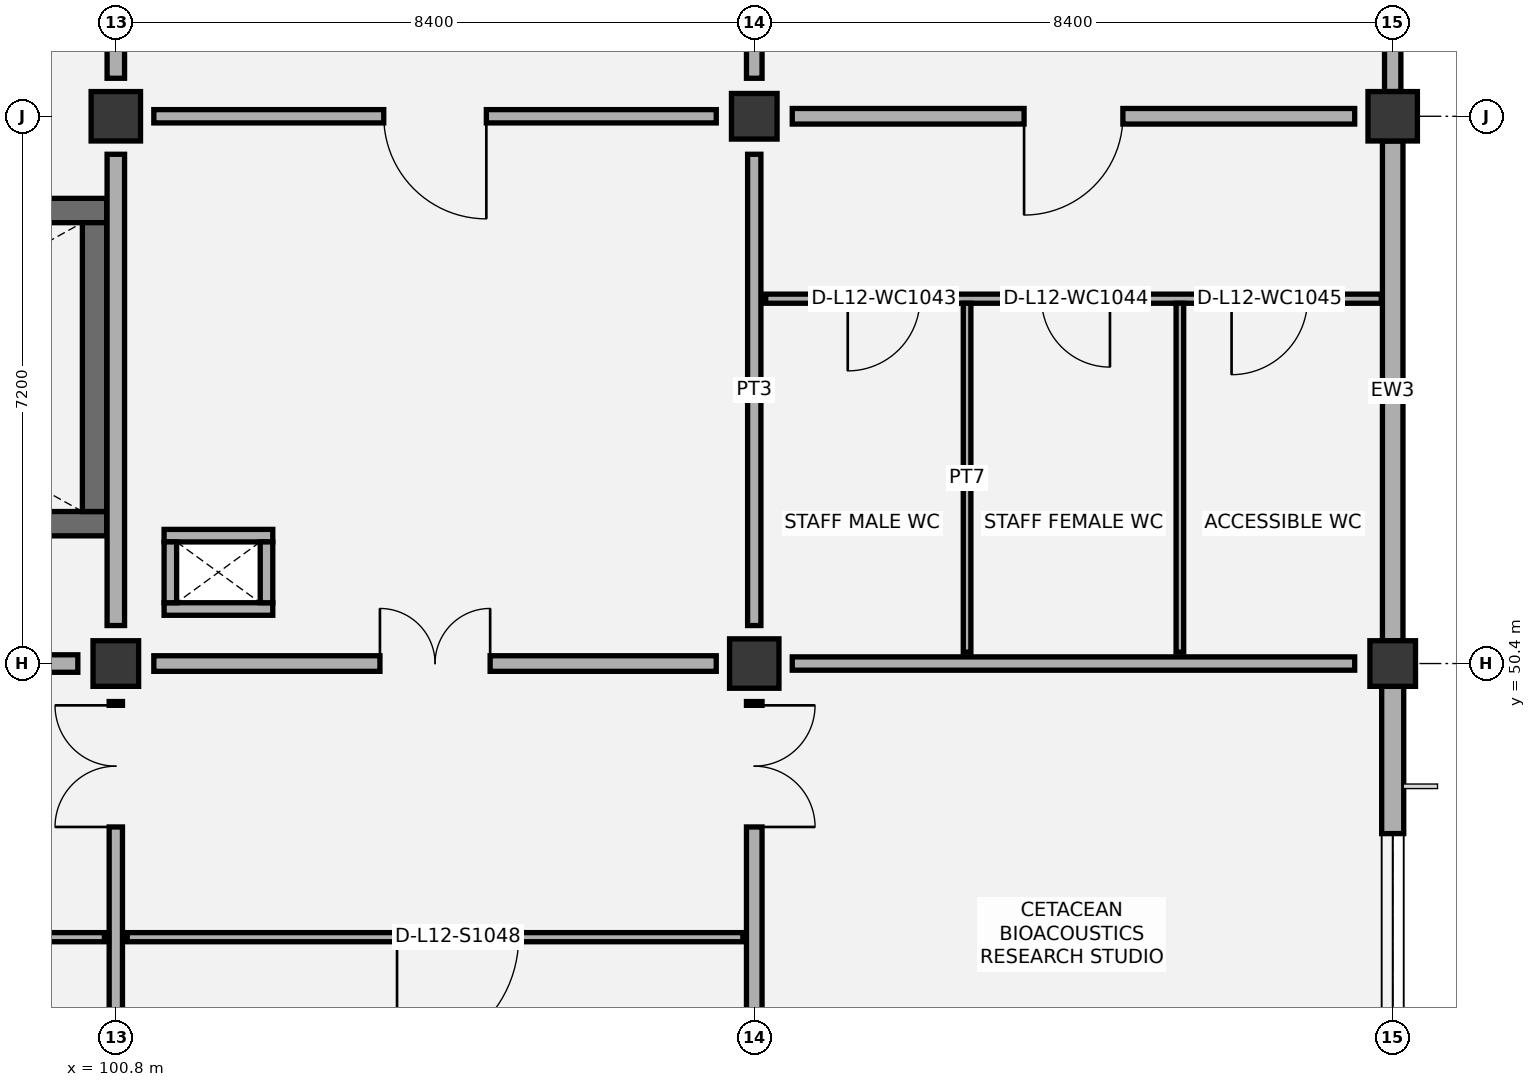
"""IFC4 building model, lengths in metres.
Left out: names, types, materials, properties, quantities, classifications, styles, units other than length and angle.
Written with IfcOpenShell. Run it as: python <this file> out.ifc"""

import sys

from ifc_helpers import new_model, si_unit, direction, frame, frame_2d, origin, origin_2d, place, context, subcontext, project, spatial, rectangle, extrude, element, fill, save


model = new_model("IFC4")
c1 = context("Model", 3, precision=1e-05, world=origin(), true_north=direction((0.0, 1.0)))
c2 = subcontext(c1, "Body", "Model", "MODEL_VIEW")
j1 = project(units=[si_unit("LENGTHUNIT", "METRE"), si_unit("PLANEANGLEUNIT", "RADIAN")], contexts=[c1])
p1 = place(None, origin())
s1 = spatial("IfcSite", under=j1, at=p1, CompositionType="ELEMENT")
p2 = place(p1, origin())
s2 = spatial("IfcBuilding", under=s1, at=p2, CompositionType="ELEMENT")
p3 = place(p2, frame((0.0, 0.0, 56.4)))
s3 = spatial("IfcBuildingStorey", under=s2, at=p3, CompositionType="ELEMENT", Elevation=56.4)
p4 = place(p3, frame((100.8, 50.4, 0.0), z_axis=(0.0, 0.0, 1.0), x_axis=(1.0, 0.0, 0.0)))
e1 = element("IfcColumn", 1, at=p4, inside=s3, PredefinedType="COLUMN", context=c2, shape_type="SweptSolid", body=[
    extrude(rectangle(XDim=0.6, YDim=0.6, at=origin_2d()), origin(), (0.0, 0.0, 1.0), 4.2),
])
for number, where, z_axis, x_axis in (
    (2, (100.8, 57.6, 0.0), (0.0, 0.0, 1.0), (1.0, 0.0, 0.0)),
    (3, (109.2, 50.4, 0.0), (0.0, 0.0, 1.0), (1.0, 0.0, 0.0)),
):
    element("IfcColumn", number, at=place(p3, frame(where, z_axis=z_axis, x_axis=x_axis)), inside=s3, PredefinedType="COLUMN", context=c2, shape_type="SweptSolid", body=[
        extrude(rectangle(XDim=0.65, YDim=0.65, at=origin_2d()), origin(), (0.0, 0.0, 1.0), 4.2),
    ])
for number, where, z_axis, x_axis in (
    (4, (109.2, 57.6, 0.0), (0.0, 0.0, 1.0), (1.0, 0.0, 0.0)),
    (5, (117.6, 50.4, 0.0), (0.0, 0.0, 1.0), (1.0, 0.0, 0.0)),
):
    element("IfcColumn", number, at=place(p3, frame(where, z_axis=z_axis, x_axis=x_axis)), inside=s3, PredefinedType="COLUMN", context=c2, shape_type="SweptSolid", body=[
        extrude(rectangle(XDim=0.6, YDim=0.6, at=origin_2d()), origin(), (0.0, 0.0, 1.0), 4.2),
    ])
p5 = place(p3, frame((117.6, 57.6, 0.0), z_axis=(0.0, 0.0, 1.0), x_axis=(1.0, 0.0, 0.0)))
e6 = element("IfcColumn", 6, at=p5, inside=s3, PredefinedType="COLUMN", context=c2, shape_type="SweptSolid", body=[
    extrude(rectangle(XDim=0.65, YDim=0.65, at=origin_2d()), origin(), (0.0, 0.0, 1.0), 4.2),
])
p6 = place(p3, frame((93.2, 52.24, 0.0), z_axis=(0.0, 0.0, 1.0), x_axis=(1.0, 0.0, 0.0)))
e7 = element("IfcWall", 7, at=p6, inside=s3, PredefinedType="SHEAR", context=c2, shape_type="SweptSolid", body=[
    extrude(rectangle(XDim=7.48, YDim=0.32, at=frame_2d((3.74, 0.0))), origin(), (0.0, 0.0, 1.0), 3.92),
])
p7 = place(p6, frame((0.45, 0.0, 0.0)))
e8 = element("IfcOpeningElement", 8, at=p7, cuts=e7, PredefinedType="OPENING", context=c2, shape_type="SweptSolid", body=[
    extrude(rectangle(XDim=1.05, YDim=2.15, at=frame_2d((0.525, 1.075))), frame((0.0, 0.17, 0.0), z_axis=(0.0, -1.0, 0.0), x_axis=(1.0, 0.0, 0.0)), (0.0, 0.0, 1.0), 0.34),
])
p8 = place(p3, frame((93.2, 56.36, 0.0), z_axis=(0.0, 0.0, 1.0), x_axis=(1.0, 0.0, 0.0)))
e9 = element("IfcWall", 9, at=p8, inside=s3, PredefinedType="SHEAR", context=c2, shape_type="SweptSolid", body=[
    extrude(rectangle(XDim=7.48, YDim=0.32, at=frame_2d((3.74, 0.0))), origin(), (0.0, 0.0, 1.0), 3.92),
])
p9 = place(p3, frame((100.52, 52.4, 0.0), z_axis=(0.0, 0.0, 1.0), x_axis=(0.0, 1.0, 0.0)))
e10 = element("IfcWall", 10, at=p9, inside=s3, PredefinedType="SHEAR", context=c2, shape_type="SweptSolid", body=[
    extrude(rectangle(XDim=3.8, YDim=0.32, at=frame_2d((1.9, 0.0))), origin(), (0.0, 0.0, 1.0), 3.92),
])
p10 = place(p3, frame((117.6, 43.525, 0.0), z_axis=(0.0, 0.0, 1.0), x_axis=(0.0, 1.0, 0.0)))
e11 = element("IfcWall", 11, at=p10, inside=s3, PredefinedType="SOLIDWALL", context=c2, shape_type="SweptSolid", body=[
    extrude(rectangle(XDim=6.575, YDim=0.29, at=frame_2d((3.288, 0.0))), origin(), (0.0, 0.0, 1.0), 3.295),
])
p11 = place(p10, frame((1.938, 0.0, 0.95)))
e12 = element("IfcOpeningElement", 12, at=p11, cuts=e11, PredefinedType="OPENING", context=c2, shape_type="SweptSolid", body=[
    extrude(rectangle(XDim=2.7, YDim=1.65, at=frame_2d((1.35, 0.825))), frame((0.0, 0.155, 0.0), z_axis=(0.0, -1.0, 0.0), x_axis=(1.0, 0.0, 0.0)), (0.0, 0.0, 1.0), 0.31),
])
p12 = place(p3, frame((117.6, 50.7, 0.0), z_axis=(0.0, 0.0, 1.0), x_axis=(0.0, 1.0, 0.0)))
e13 = element("IfcWall", 13, at=p12, inside=s3, PredefinedType="SOLIDWALL", context=c2, shape_type="SweptSolid", body=[
    extrude(rectangle(XDim=6.575, YDim=0.27, at=frame_2d((3.288, 0.0))), origin(), (0.0, 0.0, 1.0), 3.295),
])
p13 = place(p3, frame((117.6, 57.925, 0.0), z_axis=(0.0, 0.0, 1.0), x_axis=(0.0, 1.0, 0.0)))
e14 = element("IfcWall", 14, at=p13, inside=s3, PredefinedType="SOLIDWALL", context=c2, shape_type="SweptSolid", body=[
    extrude(rectangle(XDim=6.575, YDim=0.215, at=frame_2d((3.288, 0.0))), origin(), (0.0, 0.0, 1.0), 3.295),
])
p14 = place(p13, frame((1.192, 0.0, 0.95)))
e15 = element("IfcOpeningElement", 15, at=p14, cuts=e14, PredefinedType="OPENING", context=c2, shape_type="SweptSolid", body=[
    extrude(rectangle(XDim=1.5, YDim=1.5, at=frame_2d((0.75, 0.75))), frame((0.0, 0.117, 0.0), z_axis=(0.0, -1.0, 0.0), x_axis=(1.0, 0.0, 0.0)), (0.0, 0.0, 1.0), 0.235),
])
p15 = place(p13, frame((3.883, 0.0, 0.95)))
e16 = element("IfcOpeningElement", 16, at=p15, cuts=e14, PredefinedType="OPENING", context=c2, shape_type="SweptSolid", body=[
    extrude(rectangle(XDim=1.5, YDim=1.5, at=frame_2d((0.75, 0.75))), frame((0.0, 0.117, 0.0), z_axis=(0.0, -1.0, 0.0), x_axis=(1.0, 0.0, 0.0)), (0.0, 0.0, 1.0), 0.235),
])
for number, where, z_axis, x_axis in (
    (17, (101.435, 51.117, 0.0), (0.0, 0.0, 1.0), (1.0, 0.0, 0.0)),
    (18, (101.435, 52.083, 0.0), (0.0, 0.0, 1.0), (1.0, 0.0, 0.0)),
):
    element("IfcWall", number, at=place(p3, frame(where, z_axis=z_axis, x_axis=x_axis)), inside=s3, PredefinedType="PARTITIONING", context=c2, shape_type="SweptSolid", body=[
        extrude(rectangle(XDim=1.43, YDim=0.165, at=frame_2d((0.715, 0.0))), origin(), (0.0, 0.0, 1.0), 3.85),
    ])
for number, where, z_axis, x_axis in (
    (19, (101.518, 51.2, 0.0), (0.0, 0.0, 1.0), (0.0, 1.0, 0.0)),
    (20, (102.782, 51.2, 0.0), (0.0, 0.0, 1.0), (0.0, 1.0, 0.0)),
):
    element("IfcWall", number, at=place(p3, frame(where, z_axis=z_axis, x_axis=x_axis)), inside=s3, PredefinedType="PARTITIONING", context=c2, shape_type="SweptSolid", body=[
        extrude(rectangle(XDim=0.8, YDim=0.165, at=frame_2d((0.4, 0.0))), origin(), (0.0, 0.0, 1.0), 3.85),
    ])
p16 = place(p3, frame((109.35, 55.2, 0.0), z_axis=(0.0, 0.0, 1.0), x_axis=(1.0, 0.0, 0.0)))
e21 = element("IfcWall", 21, at=p16, inside=s3, PredefinedType="PARTITIONING", context=c2, shape_type="SweptSolid", body=[
    extrude(rectangle(XDim=8.1, YDim=0.12, at=frame_2d((4.05, 0.0))), origin(), (0.0, 0.0, 1.0), 3.85),
])
p17 = place(p16, frame((1.08, 0.0, 0.0)))
e22 = element("IfcOpeningElement", 22, at=p17, cuts=e21, PredefinedType="OPENING", context=c2, shape_type="SweptSolid", body=[
    extrude(rectangle(XDim=0.95, YDim=2.1, at=frame_2d((0.475, 1.05))), frame((0.0, 0.07, 0.0), z_axis=(0.0, -1.0, 0.0), x_axis=(1.0, 0.0, 0.0)), (0.0, 0.0, 1.0), 0.14),
])
p18 = place(p16, frame((3.63, 0.0, 0.0)))
e23 = element("IfcOpeningElement", 23, at=p18, cuts=e21, PredefinedType="OPENING", context=c2, shape_type="SweptSolid", body=[
    extrude(rectangle(XDim=0.9, YDim=2.1, at=frame_2d((0.45, 1.05))), frame((0.0, 0.07, 0.0), z_axis=(0.0, -1.0, 0.0), x_axis=(1.0, 0.0, 0.0)), (0.0, 0.0, 1.0), 0.14),
])
p19 = place(p16, frame((6.13, 0.0, 0.0)))
e24 = element("IfcOpeningElement", 24, at=p19, cuts=e21, PredefinedType="OPENING", context=c2, shape_type="SweptSolid", body=[
    extrude(rectangle(XDim=1.0, YDim=2.1, at=frame_2d((0.5, 1.05))), frame((0.0, 0.07, 0.0), z_axis=(0.0, -1.0, 0.0), x_axis=(1.0, 0.0, 0.0)), (0.0, 0.0, 1.0), 0.14),
])
for number, where, z_axis, x_axis in (
    (25, (112.0, 50.55, 0.0), (0.0, 0.0, 1.0), (0.0, 1.0, 0.0)),
    (26, (114.8, 50.55, 0.0), (0.0, 0.0, 1.0), (0.0, 1.0, 0.0)),
):
    element("IfcWall", number, at=place(p3, frame(where, z_axis=z_axis, x_axis=x_axis)), inside=s3, PredefinedType="PARTITIONING", context=c2, shape_type="SweptSolid", body=[
        extrude(rectangle(XDim=4.59, YDim=0.1, at=frame_2d((2.295, 0.0))), origin(), (0.0, 0.0, 1.0), 3.85),
    ])
p20 = place(p3, frame((92.55, 46.8, 0.0), z_axis=(0.0, 0.0, 1.0), x_axis=(1.0, 0.0, 0.0)))
e27 = element("IfcWall", 27, at=p20, inside=s3, PredefinedType="PARTITIONING", context=c2, shape_type="SweptSolid", body=[
    extrude(rectangle(XDim=8.1, YDim=0.12, at=frame_2d((4.05, 0.0))), origin(), (0.0, 0.0, 1.0), 3.92),
])
p21 = place(p20, frame((3.55, 0.0, 0.0)))
e28 = element("IfcOpeningElement", 28, at=p21, cuts=e27, PredefinedType="OPENING", context=c2, shape_type="SweptSolid", body=[
    extrude(rectangle(XDim=1.6, YDim=2.2, at=frame_2d((0.8, 1.1))), frame((0.0, 0.07, 0.0), z_axis=(0.0, -1.0, 0.0), x_axis=(1.0, 0.0, 0.0)), (0.0, 0.0, 1.0), 0.14),
])
p22 = place(p3, frame((100.95, 46.8, 0.0), z_axis=(0.0, 0.0, 1.0), x_axis=(1.0, 0.0, 0.0)))
e29 = element("IfcWall", 29, at=p22, inside=s3, PredefinedType="PARTITIONING", context=c2, shape_type="SweptSolid", body=[
    extrude(rectangle(XDim=8.1, YDim=0.12, at=frame_2d((4.05, 0.0))), origin(), (0.0, 0.0, 1.0), 3.92),
])
p23 = place(p22, frame((3.55, 0.0, 0.0)))
e30 = element("IfcOpeningElement", 30, at=p23, cuts=e29, PredefinedType="OPENING", context=c2, shape_type="SweptSolid", body=[
    extrude(rectangle(XDim=1.6, YDim=2.2, at=frame_2d((0.8, 1.1))), frame((0.0, 0.07, 0.0), z_axis=(0.0, -1.0, 0.0), x_axis=(1.0, 0.0, 0.0)), (0.0, 0.0, 1.0), 0.14),
])
p24 = place(p3, frame((100.8, 43.7, 0.0), z_axis=(0.0, 0.0, 1.0), x_axis=(0.0, 1.0, 0.0)))
e31 = element("IfcWall", 31, at=p24, inside=s3, PredefinedType="PARTITIONING", context=c2, shape_type="SweptSolid", body=[
    extrude(rectangle(XDim=6.2, YDim=0.175, at=frame_2d((3.1, 0.0))), origin(), (0.0, 0.0, 1.0), 3.515),
])
p25 = place(p24, frame((4.55, 0.0, 0.0)))
e32 = element("IfcOpeningElement", 32, at=p25, cuts=e31, PredefinedType="OPENING", context=c2, shape_type="SweptSolid", body=[
    extrude(rectangle(XDim=1.6, YDim=2.2, at=frame_2d((0.8, 1.1))), frame((0.0, 0.097, 0.0), z_axis=(0.0, -1.0, 0.0), x_axis=(1.0, 0.0, 0.0)), (0.0, 0.0, 1.0), 0.195),
])
p26 = place(p3, frame((92.9, 50.4, 0.0), z_axis=(0.0, 0.0, 1.0), x_axis=(1.0, 0.0, 0.0)))
e33 = element("IfcWall", 33, at=p26, inside=s3, PredefinedType="PARTITIONING", context=c2, shape_type="SweptSolid", body=[
    extrude(rectangle(XDim=7.4, YDim=0.23, at=frame_2d((3.7, 0.0))), origin(), (0.0, 0.0, 1.0), 3.415),
])
p27 = place(p26, frame((2.95, 0.0, 0.0)))
e34 = element("IfcOpeningElement", 34, at=p27, cuts=e33, PredefinedType="OPENING", context=c2, shape_type="SweptSolid", body=[
    extrude(rectangle(XDim=1.5, YDim=2.15, at=frame_2d((0.75, 1.075))), frame((0.0, 0.125, 0.0), z_axis=(0.0, -1.0, 0.0), x_axis=(1.0, 0.0, 0.0)), (0.0, 0.0, 1.0), 0.25),
])
p28 = place(p3, frame((100.8, 50.9, 0.0), z_axis=(0.0, 0.0, 1.0), x_axis=(0.0, 1.0, 0.0)))
e35 = element("IfcWall", 35, at=p28, inside=s3, PredefinedType="PARTITIONING", context=c2, shape_type="SweptSolid", body=[
    extrude(rectangle(XDim=6.2, YDim=0.23, at=frame_2d((3.1, 0.0))), origin(), (0.0, 0.0, 1.0), 3.415),
])
p29 = place(p3, frame((100.8, 58.1, 0.0), z_axis=(0.0, 0.0, 1.0), x_axis=(0.0, 1.0, 0.0)))
e36 = element("IfcWall", 36, at=p29, inside=s3, PredefinedType="PARTITIONING", context=c2, shape_type="SweptSolid", body=[
    extrude(rectangle(XDim=6.2, YDim=0.23, at=frame_2d((3.1, 0.0))), origin(), (0.0, 0.0, 1.0), 3.625),
])
p30 = place(p3, frame((109.2, 43.7, 0.0), z_axis=(0.0, 0.0, 1.0), x_axis=(0.0, 1.0, 0.0)))
e37 = element("IfcWall", 37, at=p30, inside=s3, PredefinedType="PARTITIONING", context=c2, shape_type="SweptSolid", body=[
    extrude(rectangle(XDim=6.2, YDim=0.205, at=frame_2d((3.1, 0.0))), origin(), (0.0, 0.0, 1.0), 3.345),
])
p31 = place(p30, frame((4.55, 0.0, 0.0)))
e38 = element("IfcOpeningElement", 38, at=p31, cuts=e37, PredefinedType="OPENING", context=c2, shape_type="SweptSolid", body=[
    extrude(rectangle(XDim=1.6, YDim=2.2, at=frame_2d((0.8, 1.1))), frame((0.0, 0.113, 0.0), z_axis=(0.0, -1.0, 0.0), x_axis=(1.0, 0.0, 0.0)), (0.0, 0.0, 1.0), 0.225),
])
p32 = place(p3, frame((101.3, 50.4, 0.0), z_axis=(0.0, 0.0, 1.0), x_axis=(1.0, 0.0, 0.0)))
e39 = element("IfcWall", 39, at=p32, inside=s3, PredefinedType="PARTITIONING", context=c2, shape_type="SweptSolid", body=[
    extrude(rectangle(XDim=7.4, YDim=0.205, at=frame_2d((3.7, 0.0))), origin(), (0.0, 0.0, 1.0), 3.415),
])
p33 = place(p32, frame((2.975, 0.0, 0.0)))
e40 = element("IfcOpeningElement", 40, at=p33, cuts=e39, PredefinedType="OPENING", context=c2, shape_type="SweptSolid", body=[
    extrude(rectangle(XDim=1.45, YDim=2.2, at=frame_2d((0.725, 1.1))), frame((0.0, 0.113, 0.0), z_axis=(0.0, -1.0, 0.0), x_axis=(1.0, 0.0, 0.0)), (0.0, 0.0, 1.0), 0.225),
])
p34 = place(p3, frame((109.2, 50.9, 0.0), z_axis=(0.0, 0.0, 1.0), x_axis=(0.0, 1.0, 0.0)))
e41 = element("IfcWall", 41, at=p34, inside=s3, PredefinedType="PARTITIONING", context=c2, shape_type="SweptSolid", body=[
    extrude(rectangle(XDim=6.2, YDim=0.175, at=frame_2d((3.1, 0.0))), origin(), (0.0, 0.0, 1.0), 3.555),
])
p35 = place(p3, frame((101.3, 57.6, 0.0), z_axis=(0.0, 0.0, 1.0), x_axis=(1.0, 0.0, 0.0)))
e42 = element("IfcWall", 42, at=p35, inside=s3, PredefinedType="PARTITIONING", context=c2, shape_type="SweptSolid", body=[
    extrude(rectangle(XDim=7.4, YDim=0.175, at=frame_2d((3.7, 0.0))), origin(), (0.0, 0.0, 1.0), 3.415),
])
p36 = place(p35, frame((3.025, 0.0, 0.0)))
e43 = element("IfcOpeningElement", 43, at=p36, cuts=e42, PredefinedType="OPENING", context=c2, shape_type="SweptSolid", body=[
    extrude(rectangle(XDim=1.35, YDim=2.15, at=frame_2d((0.675, 1.075))), frame((0.0, 0.097, 0.0), z_axis=(0.0, -1.0, 0.0), x_axis=(1.0, 0.0, 0.0)), (0.0, 0.0, 1.0), 0.195),
])
p37 = place(p3, frame((109.2, 58.1, 0.0), z_axis=(0.0, 0.0, 1.0), x_axis=(0.0, 1.0, 0.0)))
e44 = element("IfcWall", 44, at=p37, inside=s3, PredefinedType="PARTITIONING", context=c2, shape_type="SweptSolid", body=[
    extrude(rectangle(XDim=6.2, YDim=0.205, at=frame_2d((3.1, 0.0))), origin(), (0.0, 0.0, 1.0), 3.345),
])
p38 = place(p37, frame((2.475, 0.0, 0.0)))
e45 = element("IfcOpeningElement", 45, at=p38, cuts=e44, PredefinedType="OPENING", context=c2, shape_type="SweptSolid", body=[
    extrude(rectangle(XDim=1.25, YDim=2.1, at=frame_2d((0.625, 1.05))), frame((0.0, 0.113, 0.0), z_axis=(0.0, -1.0, 0.0), x_axis=(1.0, 0.0, 0.0)), (0.0, 0.0, 1.0), 0.225),
])
p39 = place(p3, frame((109.7, 50.4, 0.0), z_axis=(0.0, 0.0, 1.0), x_axis=(1.0, 0.0, 0.0)))
e46 = element("IfcWall", 46, at=p39, inside=s3, PredefinedType="PARTITIONING", context=c2, shape_type="SweptSolid", body=[
    extrude(rectangle(XDim=7.4, YDim=0.175, at=frame_2d((3.7, 0.0))), origin(), (0.0, 0.0, 1.0), 3.345),
])
p40 = place(p3, frame((109.7, 57.6, 0.0), z_axis=(0.0, 0.0, 1.0), x_axis=(1.0, 0.0, 0.0)))
e47 = element("IfcWall", 47, at=p40, inside=s3, PredefinedType="PARTITIONING", context=c2, shape_type="SweptSolid", body=[
    extrude(rectangle(XDim=7.4, YDim=0.205, at=frame_2d((3.7, 0.0))), origin(), (0.0, 0.0, 1.0), 3.345),
])
p41 = place(p40, frame((3.05, 0.0, 0.0)))
e48 = element("IfcOpeningElement", 48, at=p41, cuts=e47, PredefinedType="OPENING", context=c2, shape_type="SweptSolid", body=[
    extrude(rectangle(XDim=1.3, YDim=2.15, at=frame_2d((0.65, 1.075))), frame((0.0, 0.113, 0.0), z_axis=(0.0, -1.0, 0.0), x_axis=(1.0, 0.0, 0.0)), (0.0, 0.0, 1.0), 0.225),
])
p42 = place(p11, origin())
e49 = element("IfcWindow", 49, at=p42, inside=s3, PartitioningType="SINGLE_PANEL", PredefinedType="WINDOW", context=c2, shape_type="SweptSolid", body=[
    extrude(rectangle(XDim=2.7, YDim=1.65, at=frame_2d((1.35, 0.825))), frame((0.0, 0.03, 0.0), z_axis=(0.0, -1.0, 0.0), x_axis=(1.0, 0.0, 0.0)), (0.0, 0.0, 1.0), 0.06),
])
fill(e12, e49)
p43 = place(p17, frame((0.95, 0.0, 0.0), z_axis=(0.0, 0.0, 1.0), x_axis=(-1.0, 0.0, 0.0)))
e50 = element("IfcDoor", 50, at=p43, inside=s3, OperationType="SINGLE_SWING_RIGHT", PredefinedType="DOOR", context=c2, shape_type="SweptSolid", body=[
    extrude(rectangle(XDim=0.95, YDim=2.1, at=frame_2d((0.475, 1.05))), frame((0.0, 0.025, 0.0), z_axis=(0.0, -1.0, 0.0), x_axis=(1.0, 0.0, 0.0)), (0.0, 0.0, 1.0), 0.05),
])
fill(e22, e50)
p44 = place(p18, frame((0.9, 0.0, 0.0), z_axis=(0.0, 0.0, 1.0), x_axis=(-1.0, 0.0, 0.0)))
e51 = element("IfcDoor", 51, at=p44, inside=s3, OperationType="SINGLE_SWING_LEFT", PredefinedType="DOOR", context=c2, shape_type="SweptSolid", body=[
    extrude(rectangle(XDim=0.9, YDim=2.1, at=frame_2d((0.45, 1.05))), frame((0.0, 0.025, 0.0), z_axis=(0.0, -1.0, 0.0), x_axis=(1.0, 0.0, 0.0)), (0.0, 0.0, 1.0), 0.05),
])
fill(e23, e51)
p45 = place(p19, frame((1.0, 0.0, 0.0), z_axis=(0.0, 0.0, 1.0), x_axis=(-1.0, 0.0, 0.0)))
e52 = element("IfcDoor", 52, at=p45, inside=s3, OperationType="SINGLE_SWING_RIGHT", PredefinedType="DOOR", context=c2, shape_type="SweptSolid", body=[
    extrude(rectangle(XDim=1.0, YDim=2.1, at=frame_2d((0.5, 1.05))), frame((0.0, 0.025, 0.0), z_axis=(0.0, -1.0, 0.0), x_axis=(1.0, 0.0, 0.0)), (0.0, 0.0, 1.0), 0.05),
])
fill(e24, e52)
p46 = place(p23, frame((1.6, 0.0, 0.0), z_axis=(0.0, 0.0, 1.0), x_axis=(-1.0, 0.0, 0.0)))
e53 = element("IfcDoor", 53, at=p46, inside=s3, OperationType="SINGLE_SWING_RIGHT", PredefinedType="DOOR", context=c2, shape_type="SweptSolid", body=[
    extrude(rectangle(XDim=1.6, YDim=2.2, at=frame_2d((0.8, 1.1))), frame((0.0, 0.025, 0.0), z_axis=(0.0, -1.0, 0.0), x_axis=(1.0, 0.0, 0.0)), (0.0, 0.0, 1.0), 0.05),
])
fill(e30, e53)
p47 = place(p25, origin())
e54 = element("IfcDoor", 54, at=p47, inside=s3, OperationType="DOUBLE_DOOR_SINGLE_SWING", PredefinedType="DOOR", context=c2, shape_type="SweptSolid", body=[
    extrude(rectangle(XDim=1.6, YDim=2.2, at=frame_2d((0.8, 1.1))), frame((0.0, 0.025, 0.0), z_axis=(0.0, -1.0, 0.0), x_axis=(1.0, 0.0, 0.0)), (0.0, 0.0, 1.0), 0.05),
])
fill(e32, e54)
p48 = place(p31, frame((1.6, 0.0, 0.0), z_axis=(0.0, 0.0, 1.0), x_axis=(-1.0, 0.0, 0.0)))
e55 = element("IfcDoor", 55, at=p48, inside=s3, OperationType="DOUBLE_DOOR_SINGLE_SWING", PredefinedType="DOOR", context=c2, shape_type="SweptSolid", body=[
    extrude(rectangle(XDim=1.6, YDim=2.2, at=frame_2d((0.8, 1.1))), frame((0.0, 0.025, 0.0), z_axis=(0.0, -1.0, 0.0), x_axis=(1.0, 0.0, 0.0)), (0.0, 0.0, 1.0), 0.05),
])
fill(e38, e55)
p49 = place(p33, origin())
e56 = element("IfcDoor", 56, at=p49, inside=s3, OperationType="DOUBLE_DOOR_SINGLE_SWING", PredefinedType="DOOR", context=c2, shape_type="SweptSolid", body=[
    extrude(rectangle(XDim=1.45, YDim=2.2, at=frame_2d((0.725, 1.1))), frame((0.0, 0.025, 0.0), z_axis=(0.0, -1.0, 0.0), x_axis=(1.0, 0.0, 0.0)), (0.0, 0.0, 1.0), 0.05),
])
fill(e40, e56)
p50 = place(p36, frame((1.35, 0.0, 0.0), z_axis=(0.0, 0.0, 1.0), x_axis=(-1.0, 0.0, 0.0)))
e57 = element("IfcDoor", 57, at=p50, inside=s3, OperationType="SINGLE_SWING_LEFT", PredefinedType="DOOR", context=c2, shape_type="SweptSolid", body=[
    extrude(rectangle(XDim=1.35, YDim=2.15, at=frame_2d((0.675, 1.075))), frame((0.0, 0.025, 0.0), z_axis=(0.0, -1.0, 0.0), x_axis=(1.0, 0.0, 0.0)), (0.0, 0.0, 1.0), 0.05),
])
fill(e43, e57)
p51 = place(p41, frame((1.3, 0.0, 0.0), z_axis=(0.0, 0.0, 1.0), x_axis=(-1.0, 0.0, 0.0)))
e58 = element("IfcDoor", 58, at=p51, inside=s3, OperationType="SINGLE_SWING_RIGHT", PredefinedType="DOOR", context=c2, shape_type="SweptSolid", body=[
    extrude(rectangle(XDim=1.3, YDim=2.15, at=frame_2d((0.65, 1.075))), frame((0.0, 0.025, 0.0), z_axis=(0.0, -1.0, 0.0), x_axis=(1.0, 0.0, 0.0)), (0.0, 0.0, 1.0), 0.05),
])
fill(e48, e58)
save(model, sys.argv[1])
